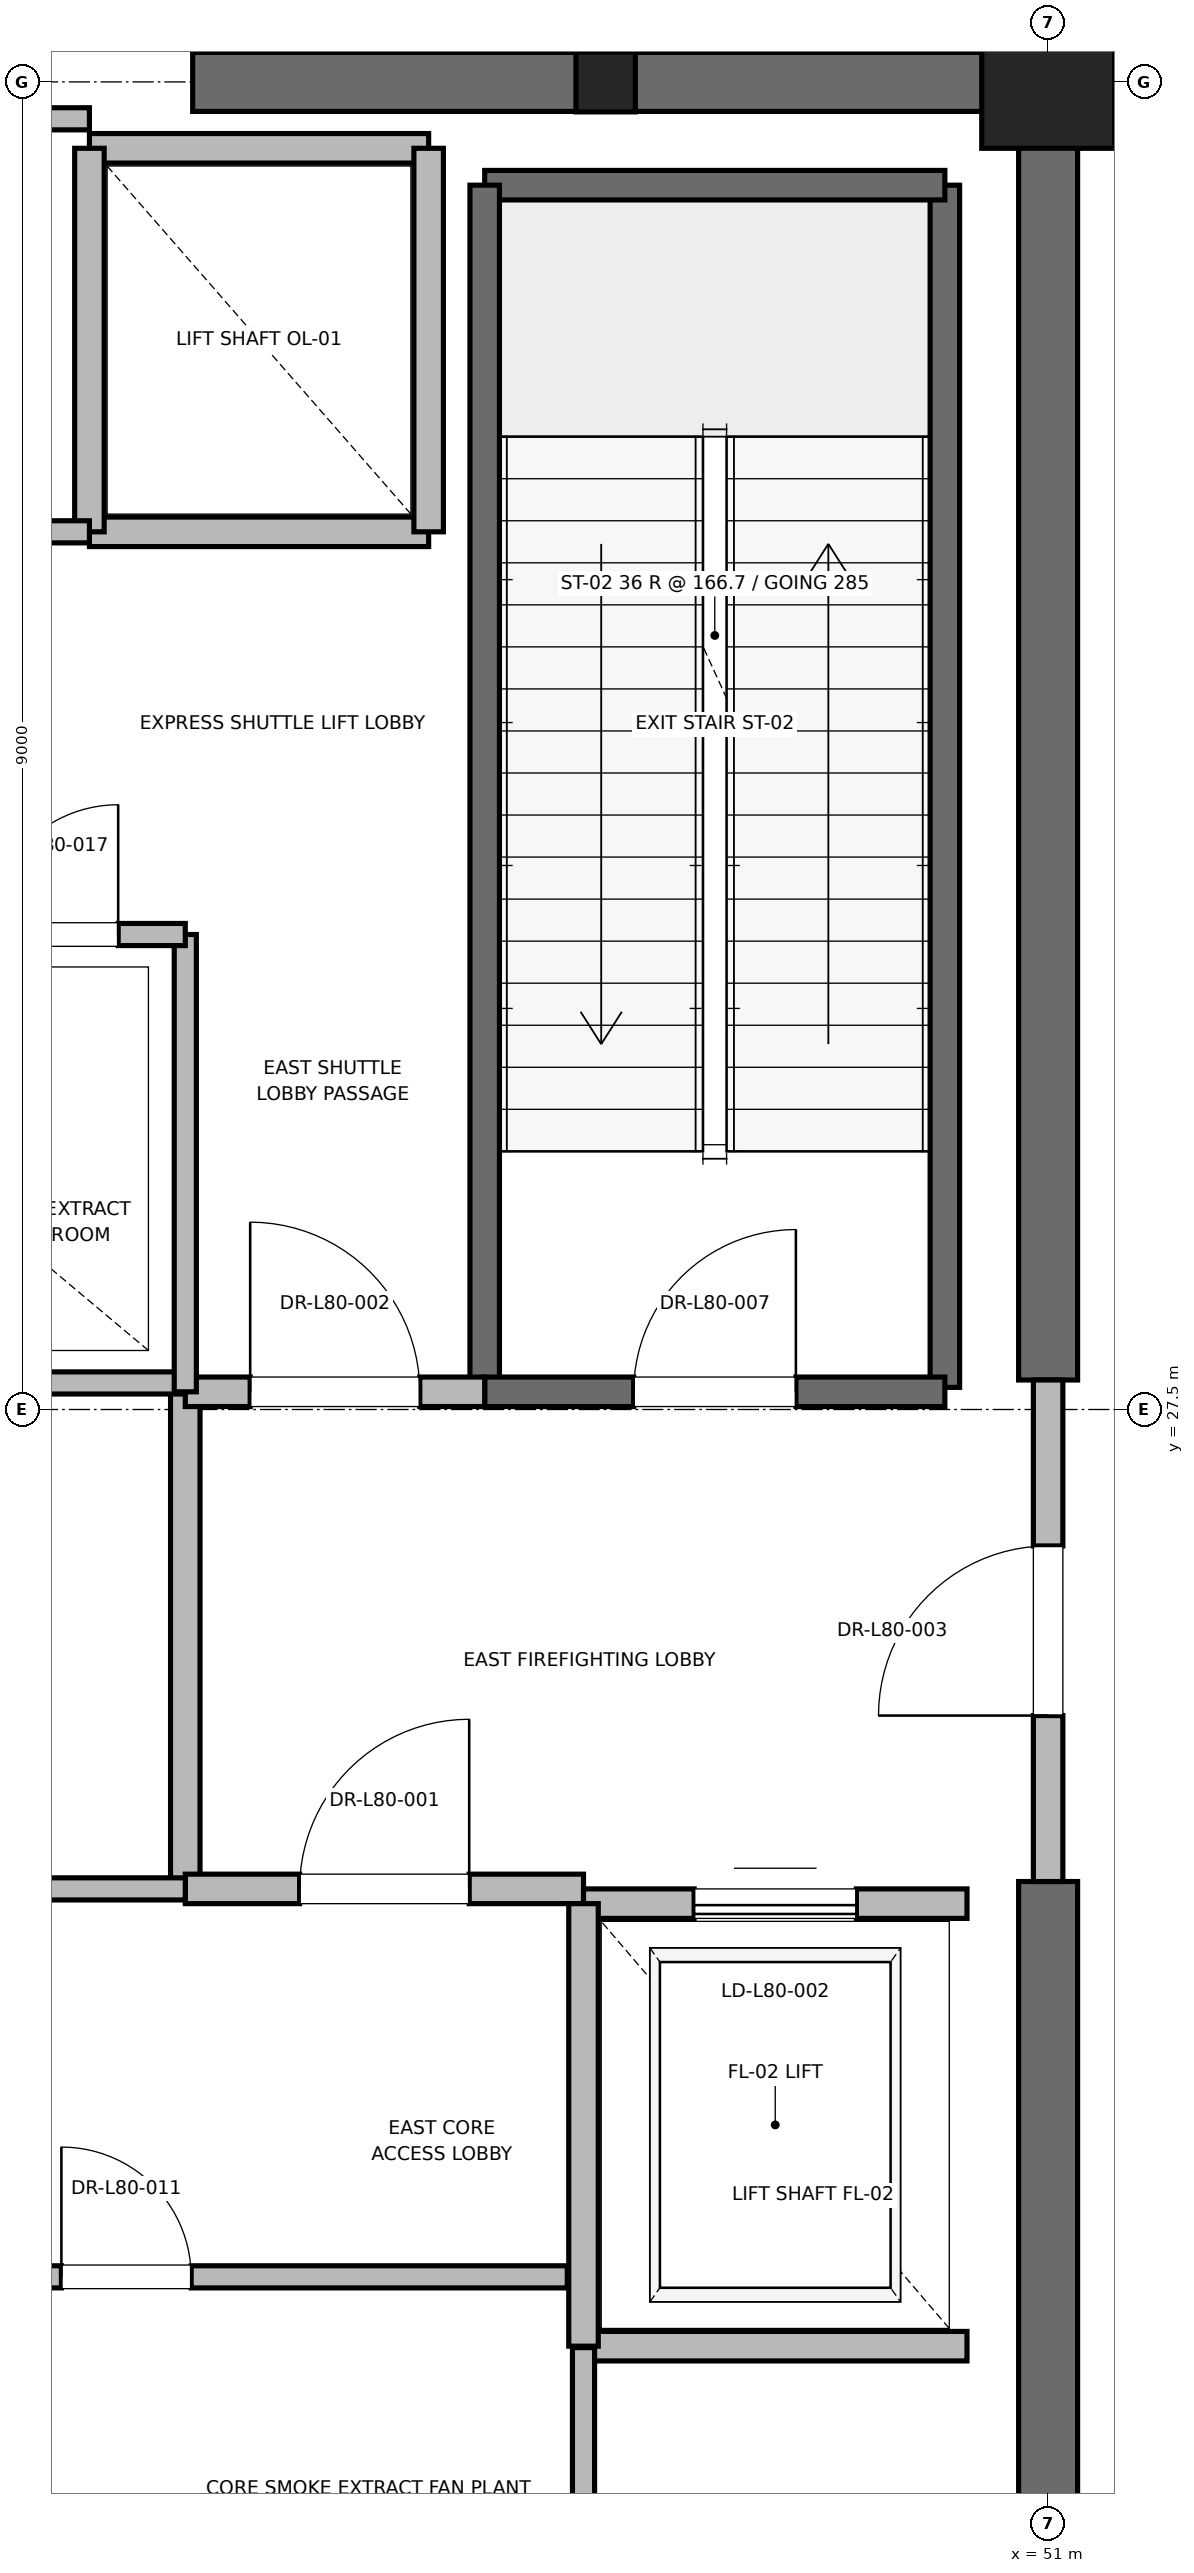
"""IFC4 building model, lengths in metres.
Left out: names, types, materials, properties, quantities, classifications, styles, units other than length and angle.
Written with IfcOpenShell. Run it as: python <this file> out.ifc"""

import sys

from ifc_helpers import new_model, si_unit, direction, frame, frame_2d, origin, origin_2d, place, context, subcontext, project, spatial, rectangle, i_section, extrude, element, fill, save


model = new_model("IFC4")
c1 = context("Model", 3, precision=1e-05, world=origin(), true_north=direction((0.0, 1.0)))
c2 = subcontext(c1, "Body", "Model", "MODEL_VIEW")
j1 = project(units=[si_unit("LENGTHUNIT", "METRE"), si_unit("PLANEANGLEUNIT", "RADIAN")], contexts=[c1])
p1 = place(None, origin())
s1 = spatial("IfcSite", under=j1, at=p1, CompositionType="ELEMENT")
p2 = place(p1, origin())
s2 = spatial("IfcBuilding", under=s1, at=p2, CompositionType="ELEMENT")
p3 = place(p2, frame((0.0, 0.0, 342.8)))
s3 = spatial("IfcBuildingStorey", under=s2, at=p3, CompositionType="ELEMENT", Elevation=342.8)
p4 = place(p3, frame((51.0, 36.5, 0.0), z_axis=(0.0, 0.0, 1.0), x_axis=(1.0, 0.0, 0.0)))
e1 = element("IfcColumn", 1, at=p4, inside=s3, PredefinedType="PILASTER", context=c2, shape_type="SweptSolid", body=[
    extrude(rectangle(XDim=0.9, YDim=0.9, at=origin_2d()), origin(), (0.0, 0.0, 1.0), 6.0),
])
p5 = place(p3, frame((48.0, 36.5, 0.0), z_axis=(0.0, 0.0, 1.0), x_axis=(1.0, 0.0, 0.0)))
e2 = element("IfcColumn", 2, at=p5, inside=s3, PredefinedType="COLUMN", context=c2, shape_type="SweptSolid", body=[
    extrude(i_section(OverallWidth=0.403, OverallDepth=0.406, WebThickness=0.027, FlangeThickness=0.043, FilletRadius=0.015, at=origin_2d()), origin(), (0.0, 0.0, 1.0), 6.0),
])
for number, where, z_axis, x_axis in (
    (3, (45.2, 36.5, 0.0), (0.0, 0.0, 1.0), (1.0, 0.0, 0.0)),
    (4, (51.0, 18.5, 0.0), (0.0, 0.0, 1.0), (0.0, 1.0, 0.0)),
):
    element("IfcWall", number, at=place(p3, frame(where, z_axis=z_axis, x_axis=x_axis)), inside=s3, PredefinedType="SHEAR", context=c2, shape_type="SweptSolid", body=[
        extrude(rectangle(XDim=5.8, YDim=0.4, at=frame_2d((2.9, 0.0))), origin(), (0.0, 0.0, 1.0), 5.7),
    ])
p6 = place(p3, frame((51.0, 27.7, 0.0), z_axis=(0.0, 0.0, 1.0), x_axis=(0.0, 1.0, 0.0)))
e5 = element("IfcWall", 5, at=p6, inside=s3, PredefinedType="SHEAR", context=c2, shape_type="SweptSolid", body=[
    extrude(rectangle(XDim=8.8, YDim=0.4, at=frame_2d((4.4, 0.0))), origin(), (0.0, 0.0, 1.0), 5.7),
])
p7 = place(p3, frame((50.3, 27.65, 0.0), z_axis=(0.0, 0.0, 1.0), x_axis=(0.0, 1.0, 0.0)))
e6 = element("IfcWall", 6, at=p7, inside=s3, PredefinedType="SOLIDWALL", context=c2, shape_type="SweptSolid", body=[
    extrude(rectangle(XDim=8.15, YDim=0.2, at=frame_2d((4.075, 0.0))), origin(), (0.0, 0.0, 1.0), 5.7),
])
p8 = place(p3, frame((47.18, 35.8, 0.0), z_axis=(0.0, 0.0, 1.0), x_axis=(1.0, 0.0, 0.0)))
e7 = element("IfcWall", 7, at=p8, inside=s3, PredefinedType="SOLIDWALL", context=c2, shape_type="SweptSolid", body=[
    extrude(rectangle(XDim=3.12, YDim=0.2, at=frame_2d((1.56, 0.0))), origin(), (0.0, 0.0, 1.0), 5.7),
])
p9 = place(p3, frame((47.18, 27.62, 0.0), z_axis=(0.0, 0.0, 1.0), x_axis=(0.0, 1.0, 0.0)))
e8 = element("IfcWall", 8, at=p9, inside=s3, PredefinedType="SOLIDWALL", context=c2, shape_type="SweptSolid", body=[
    extrude(rectangle(XDim=8.18, YDim=0.2, at=frame_2d((4.09, 0.0))), origin(), (0.0, 0.0, 1.0), 5.7),
])
p10 = place(p3, frame((47.18, 27.62, 0.0), z_axis=(0.0, 0.0, 1.0), x_axis=(1.0, 0.0, 0.0)))
e9 = element("IfcWall", 9, at=p10, inside=s3, PredefinedType="SOLIDWALL", context=c2, shape_type="SweptSolid", body=[
    extrude(rectangle(XDim=3.12, YDim=0.2, at=frame_2d((1.56, 0.0))), origin(), (0.0, 0.0, 1.0), 5.7),
])
p11 = place(p10, frame((1.01, 0.0, 0.0)))
e10 = element("IfcOpeningElement", 10, at=p11, cuts=e9, PredefinedType="OPENING", context=c2, shape_type="SweptSolid", body=[
    extrude(rectangle(XDim=1.1, YDim=2.15, at=frame_2d((0.55, 1.075))), frame((0.0, 0.1, 0.0), z_axis=(0.0, -1.0, 0.0), x_axis=(1.0, 0.0, 0.0)), (0.0, 0.0, 1.0), 0.2),
])
p12 = place(p3, frame((45.15, 24.25, 0.0), z_axis=(0.0, 0.0, 1.0), x_axis=(0.0, 1.0, 0.0)))
e11 = element("IfcWall", 11, at=p12, inside=s3, PredefinedType="PARTITIONING", context=c2, shape_type="SweptSolid", body=[
    extrude(rectangle(XDim=3.37, YDim=0.2, at=frame_2d((1.685, 0.0))), origin(), (0.0, 0.0, 1.0), 5.7),
])
p13 = place(p3, frame((45.15, 24.25, 0.0), z_axis=(0.0, 0.0, 1.0), x_axis=(1.0, 0.0, 0.0)))
e12 = element("IfcWall", 12, at=p13, inside=s3, PredefinedType="PARTITIONING", context=c2, shape_type="SweptSolid", body=[
    extrude(rectangle(XDim=2.7, YDim=0.2, at=frame_2d((1.35, 0.0))), origin(), (0.0, 0.0, 1.0), 5.7),
])
p14 = place(p13, frame((0.775, 0.0, 0.0)))
e13 = element("IfcOpeningElement", 13, at=p14, cuts=e12, PredefinedType="OPENING", context=c2, shape_type="SweptSolid", body=[
    extrude(rectangle(XDim=1.15, YDim=2.2, at=frame_2d((0.575, 1.1))), frame((0.0, 0.1, 0.0), z_axis=(0.0, -1.0, 0.0), x_axis=(1.0, 0.0, 0.0)), (0.0, 0.0, 1.0), 0.2),
])
p15 = place(p3, frame((45.15, 27.62, 0.0), z_axis=(0.0, 0.0, 1.0), x_axis=(1.0, 0.0, 0.0)))
e14 = element("IfcWall", 14, at=p15, inside=s3, PredefinedType="PARTITIONING", context=c2, shape_type="SweptSolid", body=[
    extrude(rectangle(XDim=2.03, YDim=0.2, at=frame_2d((1.015, 0.0))), origin(), (0.0, 0.0, 1.0), 5.7),
])
p16 = place(p15, frame((0.44, 0.0, 0.0)))
e15 = element("IfcOpeningElement", 15, at=p16, cuts=e14, PredefinedType="OPENING", context=c2, shape_type="SweptSolid", body=[
    extrude(rectangle(XDim=1.15, YDim=2.2, at=frame_2d((0.575, 1.1))), frame((0.0, 0.1, 0.0), z_axis=(0.0, -1.0, 0.0), x_axis=(1.0, 0.0, 0.0)), (0.0, 0.0, 1.0), 0.2),
])
p17 = place(p3, frame((51.0, 24.3, 0.0), z_axis=(0.0, 0.0, 1.0), x_axis=(0.0, 1.0, 0.0)))
e16 = element("IfcWall", 16, at=p17, inside=s3, PredefinedType="PARTITIONING", context=c2, shape_type="SweptSolid", body=[
    extrude(rectangle(XDim=3.4, YDim=0.2, at=frame_2d((1.7, 0.0))), origin(), (0.0, 0.0, 1.0), 4.78),
])
p18 = place(p17, frame((1.125, 0.0, 0.0)))
e17 = element("IfcOpeningElement", 17, at=p18, cuts=e16, PredefinedType="OPENING", context=c2, shape_type="SweptSolid", body=[
    extrude(rectangle(XDim=1.15, YDim=2.2, at=frame_2d((0.575, 1.1))), frame((0.0, 0.1, 0.0), z_axis=(0.0, -1.0, 0.0), x_axis=(1.0, 0.0, 0.0)), (0.0, 0.0, 1.0), 0.2),
])
p19 = place(p3, frame((47.85, 21.15, 0.0), z_axis=(0.0, 0.0, 1.0), x_axis=(1.0, 0.0, 0.0)))
e18 = element("IfcWall", 18, at=p19, inside=s3, PredefinedType="SOLIDWALL", context=c2, shape_type="SweptSolid", body=[
    extrude(rectangle(XDim=2.6, YDim=0.2, at=frame_2d((1.3, 0.0))), origin(), (0.0, 0.0, 1.0), 5.7),
])
p20 = place(p3, frame((50.45, 24.15, 0.0), z_axis=(0.0, 0.0, 1.0), x_axis=(-1.0, 0.0, 0.0)))
e19 = element("IfcWall", 19, at=p20, inside=s3, PredefinedType="SOLIDWALL", context=c2, shape_type="SweptSolid", body=[
    extrude(rectangle(XDim=2.6, YDim=0.2, at=frame_2d((1.3, 0.0))), origin(), (0.0, 0.0, 1.0), 4.78),
])
p21 = place(p20, frame((0.75, 0.0, 0.0)))
e20 = element("IfcOpeningElement", 20, at=p21, cuts=e19, PredefinedType="OPENING", context=c2, shape_type="SweptSolid", body=[
    extrude(rectangle(XDim=1.1, YDim=2.2, at=frame_2d((0.55, 1.1))), frame((0.0, 0.1, 0.0), z_axis=(0.0, -1.0, 0.0), x_axis=(1.0, 0.0, 0.0)), (0.0, 0.0, 1.0), 0.2),
])
p22 = place(p3, frame((47.85, 24.15, 0.0), z_axis=(0.0, 0.0, 1.0), x_axis=(0.0, -1.0, 0.0)))
e21 = element("IfcWall", 21, at=p22, inside=s3, PredefinedType="SOLIDWALL", context=c2, shape_type="SweptSolid", body=[
    extrude(rectangle(XDim=3.0, YDim=0.2, at=frame_2d((1.5, 0.0))), origin(), (0.0, 0.0, 1.0), 5.7),
])
p23 = place(p3, frame((44.5, 33.45, 0.0), z_axis=(0.0, 0.0, 1.0), x_axis=(1.0, 0.0, 0.0)))
e22 = element("IfcWall", 22, at=p23, inside=s3, PredefinedType="SOLIDWALL", context=c2, shape_type="SweptSolid", body=[
    extrude(rectangle(XDim=2.3, YDim=0.2, at=frame_2d((1.15, 0.0))), origin(), (0.0, 0.0, 1.0), 5.7),
])
p24 = place(p3, frame((46.8, 36.05, 0.0), z_axis=(0.0, 0.0, 1.0), x_axis=(-1.0, 0.0, 0.0)))
e23 = element("IfcWall", 23, at=p24, inside=s3, PredefinedType="SOLIDWALL", context=c2, shape_type="SweptSolid", body=[
    extrude(rectangle(XDim=2.3, YDim=0.2, at=frame_2d((1.15, 0.0))), origin(), (0.0, 0.0, 1.0), 4.78),
])
p25 = place(p3, frame((44.5, 36.05, 0.0), z_axis=(0.0, 0.0, 1.0), x_axis=(0.0, -1.0, 0.0)))
e24 = element("IfcWall", 24, at=p25, inside=s3, PredefinedType="SOLIDWALL", context=c2, shape_type="SweptSolid", body=[
    extrude(rectangle(XDim=2.6, YDim=0.2, at=frame_2d((1.3, 0.0))), origin(), (0.0, 0.0, 1.0), 4.78),
])
p26 = place(p3, frame((46.8, 33.45, 0.0), z_axis=(0.0, 0.0, 1.0), x_axis=(0.0, 1.0, 0.0)))
e25 = element("IfcWall", 25, at=p26, inside=s3, PredefinedType="SOLIDWALL", context=c2, shape_type="SweptSolid", body=[
    extrude(rectangle(XDim=2.6, YDim=0.2, at=frame_2d((1.3, 0.0))), origin(), (0.0, 0.0, 1.0), 5.7),
])
p27 = place(p3, frame((41.56, 27.68, 0.0), z_axis=(0.0, 0.0, 1.0), x_axis=(1.0, 0.0, 0.0)))
e26 = element("IfcWall", 26, at=p27, inside=s3, PredefinedType="PARTITIONING", context=c2, shape_type="SweptSolid", body=[
    extrude(rectangle(XDim=3.59, YDim=0.15, at=frame_2d((1.795, 0.0))), origin(), (0.0, 0.0, 1.0), 2.85),
])
p28 = place(p3, frame((47.85, 18.6, 0.0), z_axis=(0.0, 0.0, 1.0), x_axis=(0.0, 1.0, 0.0)))
e27 = element("IfcWall", 27, at=p28, inside=s3, PredefinedType="PARTITIONING", context=c2, shape_type="SweptSolid", body=[
    extrude(rectangle(XDim=2.54, YDim=0.15, at=frame_2d((1.27, 0.0))), origin(), (0.0, 0.0, 1.0), 2.85),
])
p29 = place(p3, frame((41.76, 21.62, 0.0), z_axis=(0.0, 0.0, 1.0), x_axis=(1.0, 0.0, 0.0)))
e28 = element("IfcWall", 28, at=p29, inside=s3, PredefinedType="PARTITIONING", context=c2, shape_type="SweptSolid", body=[
    extrude(rectangle(XDim=5.98, YDim=0.15, at=frame_2d((2.99, 0.0))), origin(), (0.0, 0.0, 1.0), 2.85),
])
p30 = place(p29, frame((2.55, 0.0, 0.0)))
e29 = element("IfcOpeningElement", 29, at=p30, cuts=e28, PredefinedType="OPENING", context=c2, shape_type="SweptSolid", body=[
    extrude(rectangle(XDim=0.88, YDim=2.1, at=frame_2d((0.44, 1.05))), frame((0.0, 0.075, 0.0), z_axis=(0.0, -1.0, 0.0), x_axis=(1.0, 0.0, 0.0)), (0.0, 0.0, 1.0), 0.15),
])
p31 = place(p3, frame((41.76, 24.25, 0.0), z_axis=(0.0, 0.0, 1.0), x_axis=(1.0, 0.0, 0.0)))
e30 = element("IfcWall", 30, at=p31, inside=s3, PredefinedType="PARTITIONING", context=c2, shape_type="SweptSolid", body=[
    extrude(rectangle(XDim=3.39, YDim=0.15, at=frame_2d((1.695, 0.0))), origin(), (0.0, 0.0, 1.0), 2.85),
])
p32 = place(p31, frame((1.255, 0.0, 0.0)))
e31 = element("IfcOpeningElement", 31, at=p32, cuts=e30, PredefinedType="OPENING", context=c2, shape_type="SweptSolid", body=[
    extrude(rectangle(XDim=0.88, YDim=2.1, at=frame_2d((0.44, 1.05))), frame((0.0, 0.075, 0.0), z_axis=(0.0, -1.0, 0.0), x_axis=(1.0, 0.0, 0.0)), (0.0, 0.0, 1.0), 0.15),
])
p33 = place(p3, frame((45.15, 27.62, 0.0), z_axis=(0.0, 0.0, 1.0), x_axis=(0.0, 1.0, 0.0)))
e32 = element("IfcWall", 32, at=p33, inside=s3, PredefinedType="PARTITIONING", context=c2, shape_type="SweptSolid", body=[
    extrude(rectangle(XDim=3.1, YDim=0.15, at=frame_2d((1.55, 0.0))), origin(), (0.0, 0.0, 1.0), 2.85),
])
p34 = place(p3, frame((43.36, 30.72, 0.0), z_axis=(0.0, 0.0, 1.0), x_axis=(1.0, 0.0, 0.0)))
e33 = element("IfcWall", 33, at=p34, inside=s3, PredefinedType="PARTITIONING", context=c2, shape_type="SweptSolid", body=[
    extrude(rectangle(XDim=1.79, YDim=0.15, at=frame_2d((0.895, 0.0))), origin(), (0.0, 0.0, 1.0), 2.85),
])
p35 = place(p34, frame((0.455, 0.0, 0.0)))
e34 = element("IfcOpeningElement", 34, at=p35, cuts=e33, PredefinedType="OPENING", context=c2, shape_type="SweptSolid", body=[
    extrude(rectangle(XDim=0.88, YDim=2.1, at=frame_2d((0.44, 1.05))), frame((0.0, 0.075, 0.0), z_axis=(0.0, -1.0, 0.0), x_axis=(1.0, 0.0, 0.0)), (0.0, 0.0, 1.0), 0.15),
])
p36 = place(p3, frame((41.56, 36.25, 0.0), z_axis=(0.0, 0.0, 1.0), x_axis=(1.0, 0.0, 0.0)))
e35 = element("IfcWall", 35, at=p36, inside=s3, PredefinedType="PARTITIONING", context=c2, shape_type="SweptSolid", body=[
    extrude(rectangle(XDim=2.94, YDim=0.15, at=frame_2d((1.47, 0.0))), origin(), (0.0, 0.0, 1.0), 2.85),
])
p37 = place(p3, frame((41.56, 33.45, 0.0), z_axis=(0.0, 0.0, 1.0), x_axis=(1.0, 0.0, 0.0)))
e36 = element("IfcWall", 36, at=p37, inside=s3, PredefinedType="PARTITIONING", context=c2, shape_type="SweptSolid", body=[
    extrude(rectangle(XDim=2.94, YDim=0.15, at=frame_2d((1.47, 0.0))), origin(), (0.0, 0.0, 1.0), 2.85),
])
p38 = place(p37, frame((1.03, 0.0, 0.0)))
e37 = element("IfcOpeningElement", 37, at=p38, cuts=e36, PredefinedType="OPENING", context=c2, shape_type="SweptSolid", body=[
    extrude(rectangle(XDim=0.88, YDim=2.1, at=frame_2d((0.44, 1.05))), frame((0.0, 0.075, 0.0), z_axis=(0.0, -1.0, 0.0), x_axis=(1.0, 0.0, 0.0)), (0.0, 0.0, 1.0), 0.15),
])
p39 = place(p11, origin())
e38 = element("IfcDoor", 38, at=p39, inside=s3, OperationType="SINGLE_SWING_RIGHT", PredefinedType="DOOR", context=c2, shape_type="SweptSolid", body=[
    extrude(rectangle(XDim=1.1, YDim=2.15, at=frame_2d((0.55, 1.075))), frame((0.0, 0.025, 0.0), z_axis=(0.0, -1.0, 0.0), x_axis=(1.0, 0.0, 0.0)), (0.0, 0.0, 1.0), 0.05),
])
fill(e10, e38)
p40 = place(p14, origin())
e39 = element("IfcDoor", 39, at=p40, inside=s3, OperationType="SINGLE_SWING_RIGHT", PredefinedType="DOOR", context=c2, shape_type="SweptSolid", body=[
    extrude(rectangle(XDim=1.15, YDim=2.2, at=frame_2d((0.575, 1.1))), frame((0.0, 0.025, 0.0), z_axis=(0.0, -1.0, 0.0), x_axis=(1.0, 0.0, 0.0)), (0.0, 0.0, 1.0), 0.05),
])
fill(e13, e39)
p41 = place(p16, origin())
e40 = element("IfcDoor", 40, at=p41, inside=s3, OperationType="SINGLE_SWING_LEFT", PredefinedType="DOOR", context=c2, shape_type="SweptSolid", body=[
    extrude(rectangle(XDim=1.15, YDim=2.2, at=frame_2d((0.575, 1.1))), frame((0.0, 0.025, 0.0), z_axis=(0.0, -1.0, 0.0), x_axis=(1.0, 0.0, 0.0)), (0.0, 0.0, 1.0), 0.05),
])
fill(e15, e40)
p42 = place(p18, origin())
e41 = element("IfcDoor", 41, at=p42, inside=s3, OperationType="SINGLE_SWING_LEFT", PredefinedType="DOOR", context=c2, shape_type="SweptSolid", body=[
    extrude(rectangle(XDim=1.15, YDim=2.2, at=frame_2d((0.575, 1.1))), frame((0.0, 0.025, 0.0), z_axis=(0.0, -1.0, 0.0), x_axis=(1.0, 0.0, 0.0)), (0.0, 0.0, 1.0), 0.05),
])
fill(e17, e41)
p43 = place(p21, origin())
e42 = element("IfcDoor", 42, at=p43, inside=s3, OperationType="SLIDING_TO_RIGHT", PredefinedType="DOOR", context=c2, shape_type="SweptSolid", body=[
    extrude(rectangle(XDim=1.1, YDim=2.2, at=frame_2d((0.55, 1.1))), frame((0.0, 0.025, 0.0), z_axis=(0.0, -1.0, 0.0), x_axis=(1.0, 0.0, 0.0)), (0.0, 0.0, 1.0), 0.05),
])
fill(e20, e42)
p44 = place(p30, origin())
e43 = element("IfcDoor", 43, at=p44, inside=s3, OperationType="SINGLE_SWING_LEFT", PredefinedType="DOOR", context=c2, shape_type="SweptSolid", body=[
    extrude(rectangle(XDim=0.88, YDim=2.1, at=frame_2d((0.44, 1.05))), frame((0.0, 0.025, 0.0), z_axis=(0.0, -1.0, 0.0), x_axis=(1.0, 0.0, 0.0)), (0.0, 0.0, 1.0), 0.05),
])
fill(e29, e43)
p45 = place(p35, origin())
e44 = element("IfcDoor", 44, at=p45, inside=s3, OperationType="SINGLE_SWING_RIGHT", PredefinedType="DOOR", context=c2, shape_type="SweptSolid", body=[
    extrude(rectangle(XDim=0.88, YDim=2.1, at=frame_2d((0.44, 1.05))), frame((0.0, 0.025, 0.0), z_axis=(0.0, -1.0, 0.0), x_axis=(1.0, 0.0, 0.0)), (0.0, 0.0, 1.0), 0.05),
])
fill(e34, e44)
save(model, sys.argv[1])
